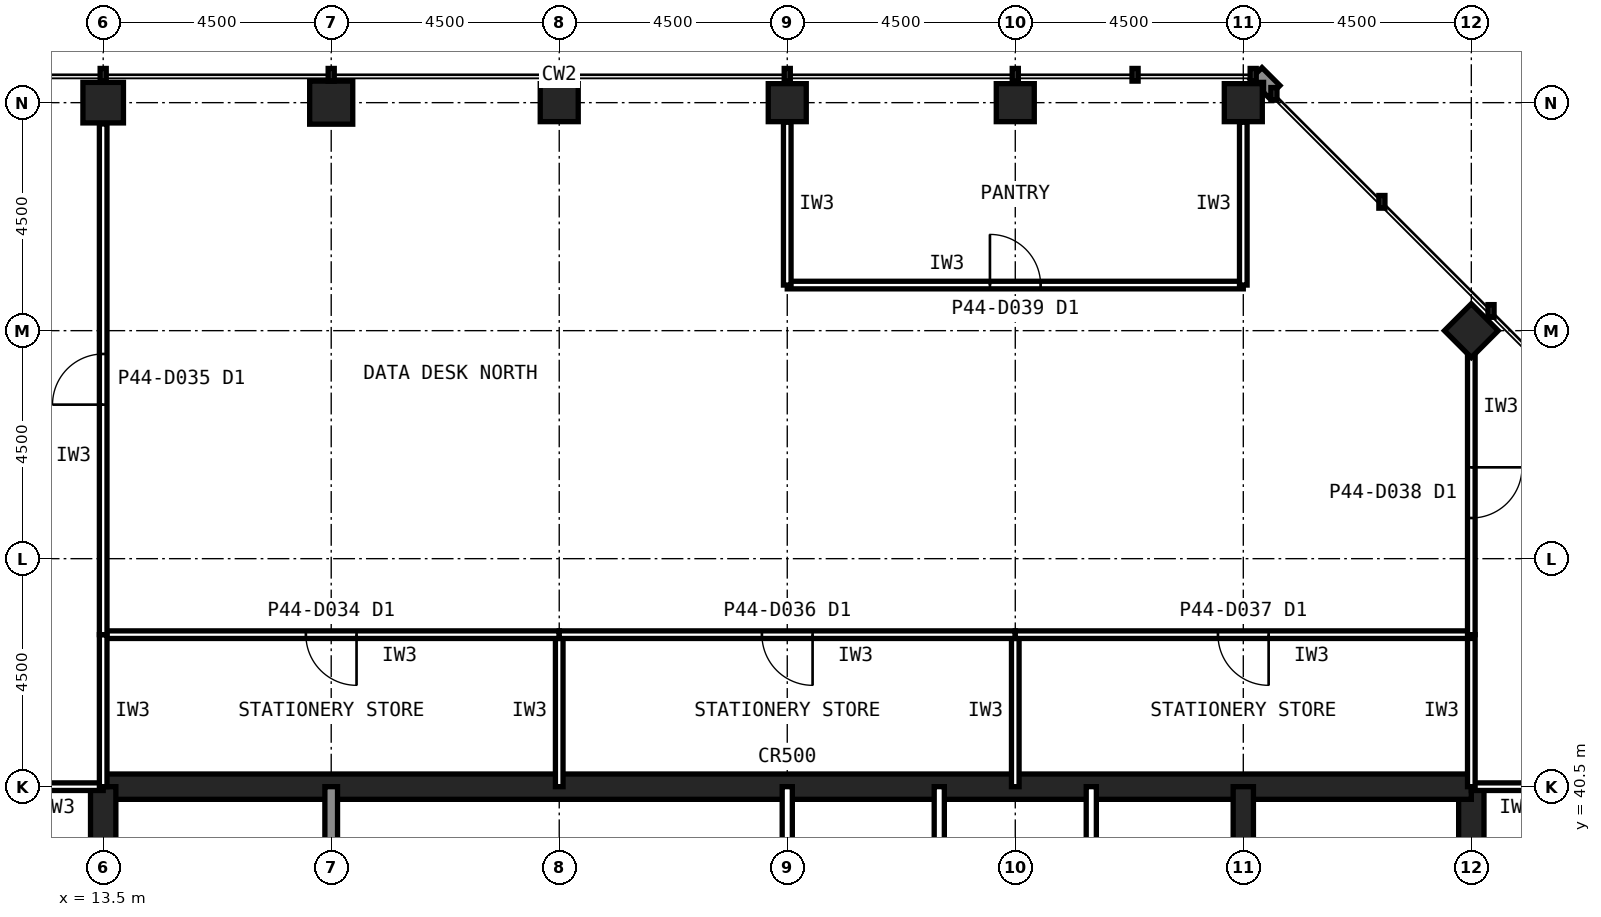
"""IFC4 building model, lengths in metres.
Left out: names, types, materials, properties, quantities, classifications, styles, units other than length and angle.
Written with IfcOpenShell. Run it as: python <this file> out.ifc"""

import sys

from ifc_helpers import new_model, si_unit, direction, frame, frame_2d, origin, origin_2d, place, context, subcontext, project, spatial, rectangle, hollow_rectangle, extrude, element, fill, save


model = new_model("IFC4")
c1 = context("Model", 3, precision=1e-05, world=origin(), true_north=direction((0.0, 1.0)))
c2 = subcontext(c1, "Body", "Model", "MODEL_VIEW")
j1 = project(units=[si_unit("LENGTHUNIT", "METRE"), si_unit("PLANEANGLEUNIT", "RADIAN")], contexts=[c1])
p1 = place(None, origin())
s1 = spatial("IfcSite", under=j1, at=p1, CompositionType="ELEMENT")
p2 = place(p1, origin())
s2 = spatial("IfcBuilding", under=s1, at=p2, CompositionType="ELEMENT")
p3 = place(p2, frame((0.0, 0.0, 183.6)))
s3 = spatial("IfcBuildingStorey", under=s2, at=p3, CompositionType="ELEMENT", Elevation=183.6)
for number, where, z_axis, x_axis in (
    (1, (36.0, 54.0, 0.0), (0.0, 0.0, 1.0), (1.0, 0.0, 0.0)),
    (2, (31.5, 54.0, 0.0), (0.0, 0.0, 1.0), (1.0, 0.0, 0.0)),
    (3, (27.0, 54.0, 0.0), (0.0, 0.0, 1.0), (1.0, 0.0, 0.0)),
    (4, (22.5, 54.0, 0.0), (0.0, 0.0, 1.0), (1.0, 0.0, 0.0)),
):
    element("IfcColumn", number, at=place(p3, frame(where, z_axis=z_axis, x_axis=x_axis)), inside=s3, PredefinedType="COLUMN", context=c2, shape_type="SweptSolid", body=[
        extrude(hollow_rectangle(XDim=0.7, YDim=0.7, WallThickness=0.036, at=origin_2d()), origin(), (0.0, 0.0, 1.0), 4.0),
    ])
p4 = place(p3, frame((18.0, 54.0, 0.0), z_axis=(0.0, 0.0, 1.0), x_axis=(1.0, 0.0, 0.0)))
e5 = element("IfcColumn", 5, at=p4, inside=s3, PredefinedType="COLUMN", context=c2, shape_type="SweptSolid", body=[
    extrude(hollow_rectangle(XDim=0.8, YDim=0.8, WallThickness=0.045, at=origin_2d()), origin(), (0.0, 0.0, 1.0), 4.0),
])
p5 = place(p3, frame((13.5, 54.0, 0.0), z_axis=(0.0, 0.0, 1.0), x_axis=(1.0, 0.0, 0.0)))
e6 = element("IfcColumn", 6, at=p5, inside=s3, PredefinedType="COLUMN", context=c2, shape_type="SweptSolid", body=[
    extrude(hollow_rectangle(XDim=0.75, YDim=0.75, WallThickness=0.04, at=origin_2d()), origin(), (0.0, 0.0, 1.0), 4.0),
])
p6 = place(p3, frame((40.5, 49.5, 0.0), z_axis=(0.0, 0.0, 1.0), x_axis=(0.707106781187, 0.707106781187, 0.0)))
e7 = element("IfcColumn", 7, at=p6, inside=s3, PredefinedType="COLUMN", context=c2, shape_type="SweptSolid", body=[
    extrude(hollow_rectangle(XDim=0.7, YDim=0.7, WallThickness=0.036, at=origin_2d()), origin(), (0.0, 0.0, 1.0), 4.0),
])
p7 = place(p3, frame((40.5, 13.5, 0.0), z_axis=(0.0, 0.0, 1.0), x_axis=(0.0, 1.0, 0.0)))
e8 = element("IfcWall", 8, at=p7, inside=s3, PredefinedType="SHEAR", context=c2, shape_type="SweptSolid", body=[
    extrude(rectangle(XDim=27.0, YDim=0.5, at=frame_2d((13.5, 0.0))), origin(), (0.0, 0.0, 1.0), 4.0),
])
p8 = place(p7, frame((5.85, 0.0, 0.0)))
e9 = element("IfcOpeningElement", 9, at=p8, cuts=e8, PredefinedType="OPENING", context=c2, shape_type="SweptSolid", body=[
    extrude(rectangle(XDim=1.8, YDim=2.1, at=frame_2d((0.9, 1.05))), frame((0.0, 0.26, 0.0), z_axis=(0.0, -1.0, 0.0), x_axis=(1.0, 0.0, 0.0)), (0.0, 0.0, 1.0), 0.52),
])
p9 = place(p7, frame((19.65, 0.0, 0.0)))
e10 = element("IfcOpeningElement", 10, at=p9, cuts=e8, PredefinedType="OPENING", context=c2, shape_type="SweptSolid", body=[
    extrude(rectangle(XDim=1.2, YDim=2.1, at=frame_2d((0.6, 1.05))), frame((0.0, 0.26, 0.0), z_axis=(0.0, -1.0, 0.0), x_axis=(1.0, 0.0, 0.0)), (0.0, 0.0, 1.0), 0.52),
])
p10 = place(p3, frame((40.5, 40.5, 0.0), z_axis=(0.0, 0.0, 1.0), x_axis=(-1.0, 0.0, 0.0)))
e11 = element("IfcWall", 11, at=p10, inside=s3, PredefinedType="SHEAR", context=c2, shape_type="SweptSolid", body=[
    extrude(rectangle(XDim=27.0, YDim=0.5, at=frame_2d((13.5, 0.0))), origin(), (0.0, 0.0, 1.0), 4.0),
])
p11 = place(p3, frame((13.5, 40.5, 0.0), z_axis=(0.0, 0.0, 1.0), x_axis=(0.0, -1.0, 0.0)))
e12 = element("IfcWall", 12, at=p11, inside=s3, PredefinedType="SHEAR", context=c2, shape_type="SweptSolid", body=[
    extrude(rectangle(XDim=27.0, YDim=0.5, at=frame_2d((13.5, 0.0))), origin(), (0.0, 0.0, 1.0), 4.0),
])
p12 = place(p11, frame((19.65, 0.0, 0.0)))
e13 = element("IfcOpeningElement", 13, at=p12, cuts=e12, PredefinedType="OPENING", context=c2, shape_type="SweptSolid", body=[
    extrude(rectangle(XDim=1.2, YDim=2.1, at=frame_2d((0.6, 1.05))), frame((0.0, 0.26, 0.0), z_axis=(0.0, -1.0, 0.0), x_axis=(1.0, 0.0, 0.0)), (0.0, 0.0, 1.0), 0.52),
])
p13 = place(p11, frame((5.85, 0.0, 0.0)))
e14 = element("IfcOpeningElement", 14, at=p13, cuts=e12, PredefinedType="OPENING", context=c2, shape_type="SweptSolid", body=[
    extrude(rectangle(XDim=1.8, YDim=2.1, at=frame_2d((0.9, 1.05))), frame((0.0, 0.26, 0.0), z_axis=(0.0, -1.0, 0.0), x_axis=(1.0, 0.0, 0.0)), (0.0, 0.0, 1.0), 0.52),
])
p14 = place(p3, frame((18.0, 36.0, 0.0), z_axis=(0.0, 0.0, 1.0), x_axis=(0.0, 1.0, 0.0)))
e15 = element("IfcWall", 15, at=p14, inside=s3, PredefinedType="SOLIDWALL", context=c2, shape_type="SweptSolid", body=[
    extrude(rectangle(XDim=4.5, YDim=0.25, at=frame_2d((2.25, 0.0))), origin(), (0.0, 0.0, 1.0), 3.84),
])
p15 = place(p3, frame((36.0, 22.5, 0.0), z_axis=(0.0, 0.0, 1.0), x_axis=(0.0, 1.0, 0.0)))
e16 = element("IfcWall", 16, at=p15, inside=s3, PredefinedType="SHEAR", context=c2, shape_type="SweptSolid", body=[
    extrude(rectangle(XDim=18.0, YDim=0.4, at=frame_2d((9.0, 0.0))), origin(), (0.0, 0.0, 1.0), 4.0),
])
for number, where, z_axis, x_axis in (
    (17, (21.0, 36.0, 0.0), (0.0, 0.0, 1.0), (0.0, 1.0, 0.0)),
    (18, (27.0, 36.0, 0.0), (0.0, 0.0, 1.0), (0.0, 1.0, 0.0)),
    (19, (30.0, 36.0, 0.0), (0.0, 0.0, 1.0), (0.0, 1.0, 0.0)),
    (20, (33.0, 36.0, 0.0), (0.0, 0.0, 1.0), (0.0, 1.0, 0.0)),
):
    element("IfcWall", number, at=place(p3, frame(where, z_axis=z_axis, x_axis=x_axis)), inside=s3, PredefinedType="PARTITIONING", context=c2, shape_type="SweptSolid", body=[
        extrude(rectangle(XDim=4.5, YDim=0.2, at=frame_2d((2.25, 0.0))), origin(), (0.0, 0.0, 1.0), 3.84),
    ])
p16 = place(p3, frame((22.5, 45.3, 0.0), z_axis=(0.0, 0.0, 1.0), x_axis=(-1.0, 0.0, 0.0)))
e21 = element("IfcWall", 21, at=p16, inside=s3, PredefinedType="PARTITIONING", context=c2, shape_type="SweptSolid", body=[
    extrude(rectangle(XDim=10.8, YDim=0.15, at=frame_2d((5.4, 0.0))), origin(), (0.0, 0.0, 1.0), 3.84),
])
p17 = place(p16, frame((4.9, 0.0, 0.0)))
e22 = element("IfcOpeningElement", 22, at=p17, cuts=e21, PredefinedType="OPENING", context=c2, shape_type="SweptSolid", body=[
    extrude(rectangle(XDim=1.0, YDim=2.1, at=frame_2d((0.5, 1.05))), frame((0.0, 0.085, 0.0), z_axis=(0.0, -1.0, 0.0), x_axis=(1.0, 0.0, 0.0)), (0.0, 0.0, 1.0), 0.17),
])
for number, where, z_axis, x_axis in (
    (23, (22.5, 43.5, 0.0), (0.0, 0.0, 1.0), (0.0, 1.0, 0.0)),
    (24, (42.3, 40.5, 0.0), (0.0, 0.0, 1.0), (-1.0, 0.0, 0.0)),
):
    element("IfcWall", number, at=place(p3, frame(where, z_axis=z_axis, x_axis=x_axis)), inside=s3, PredefinedType="PARTITIONING", context=c2, shape_type="SweptSolid", body=[
        extrude(rectangle(XDim=1.8, YDim=0.15, at=frame_2d((0.9, 0.0))), origin(), (0.0, 0.0, 1.0), 2.989),
    ])
p18 = place(p3, frame((22.5, 40.5, 0.0), z_axis=(0.0, 0.0, 1.0), x_axis=(0.0, 1.0, 0.0)))
e25 = element("IfcWall", 25, at=p18, inside=s3, PredefinedType="PARTITIONING", context=c2, shape_type="SweptSolid", body=[
    extrude(rectangle(XDim=3.0, YDim=0.15, at=frame_2d((1.5, 0.0))), origin(), (0.0, 0.0, 1.0), 2.989),
])
p19 = place(p3, frame((22.5, 43.5, 0.0), z_axis=(0.0, 0.0, 1.0), x_axis=(-1.0, 0.0, 0.0)))
e26 = element("IfcWall", 26, at=p19, inside=s3, PredefinedType="PARTITIONING", context=c2, shape_type="SweptSolid", body=[
    extrude(rectangle(XDim=9.0, YDim=0.15, at=frame_2d((4.5, 0.0))), origin(), (0.0, 0.0, 1.0), 3.84),
])
p20 = place(p19, frame((4.0, 0.0, 0.0)))
e27 = element("IfcOpeningElement", 27, at=p20, cuts=e26, PredefinedType="OPENING", context=c2, shape_type="SweptSolid", body=[
    extrude(rectangle(XDim=1.0, YDim=2.1, at=frame_2d((0.5, 1.05))), frame((0.0, 0.085, 0.0), z_axis=(0.0, -1.0, 0.0), x_axis=(1.0, 0.0, 0.0)), (0.0, 0.0, 1.0), 0.17),
])
for number, where, z_axis, x_axis in (
    (28, (13.5, 43.5, 0.0), (0.0, 0.0, 1.0), (0.0, -1.0, 0.0)),
    (29, (31.5, 40.5, 0.0), (0.0, 0.0, 1.0), (0.0, 1.0, 0.0)),
):
    element("IfcWall", number, at=place(p3, frame(where, z_axis=z_axis, x_axis=x_axis)), inside=s3, PredefinedType="PARTITIONING", context=c2, shape_type="SweptSolid", body=[
        extrude(rectangle(XDim=3.0, YDim=0.15, at=frame_2d((1.5, 0.0))), origin(), (0.0, 0.0, 1.0), 2.989),
    ])
p21 = place(p3, frame((31.5, 43.5, 0.0), z_axis=(0.0, 0.0, 1.0), x_axis=(-1.0, 0.0, 0.0)))
e30 = element("IfcWall", 30, at=p21, inside=s3, PredefinedType="PARTITIONING", context=c2, shape_type="SweptSolid", body=[
    extrude(rectangle(XDim=9.0, YDim=0.15, at=frame_2d((4.5, 0.0))), origin(), (0.0, 0.0, 1.0), 3.84),
])
p22 = place(p21, frame((4.0, 0.0, 0.0)))
e31 = element("IfcOpeningElement", 31, at=p22, cuts=e30, PredefinedType="OPENING", context=c2, shape_type="SweptSolid", body=[
    extrude(rectangle(XDim=1.0, YDim=2.1, at=frame_2d((0.5, 1.05))), frame((0.0, 0.085, 0.0), z_axis=(0.0, -1.0, 0.0), x_axis=(1.0, 0.0, 0.0)), (0.0, 0.0, 1.0), 0.17),
])
p23 = place(p3, frame((40.5, 40.5, 0.0), z_axis=(0.0, 0.0, 1.0), x_axis=(0.0, 1.0, 0.0)))
e32 = element("IfcWall", 32, at=p23, inside=s3, PredefinedType="PARTITIONING", context=c2, shape_type="SweptSolid", body=[
    extrude(rectangle(XDim=3.0, YDim=0.15, at=frame_2d((1.5, 0.0))), origin(), (0.0, 0.0, 1.0), 2.989),
])
p24 = place(p3, frame((40.5, 43.5, 0.0), z_axis=(0.0, 0.0, 1.0), x_axis=(-1.0, 0.0, 0.0)))
e33 = element("IfcWall", 33, at=p24, inside=s3, PredefinedType="PARTITIONING", context=c2, shape_type="SweptSolid", body=[
    extrude(rectangle(XDim=9.0, YDim=0.15, at=frame_2d((4.5, 0.0))), origin(), (0.0, 0.0, 1.0), 3.84),
])
p25 = place(p24, frame((4.0, 0.0, 0.0)))
e34 = element("IfcOpeningElement", 34, at=p25, cuts=e33, PredefinedType="OPENING", context=c2, shape_type="SweptSolid", body=[
    extrude(rectangle(XDim=1.0, YDim=2.1, at=frame_2d((0.5, 1.05))), frame((0.0, 0.085, 0.0), z_axis=(0.0, -1.0, 0.0), x_axis=(1.0, 0.0, 0.0)), (0.0, 0.0, 1.0), 0.17),
])
p26 = place(p3, frame((27.0, 50.4, 0.0), z_axis=(0.0, 0.0, 1.0), x_axis=(1.0, 0.0, 0.0)))
e35 = element("IfcWall", 35, at=p26, inside=s3, PredefinedType="PARTITIONING", context=c2, shape_type="SweptSolid", body=[
    extrude(rectangle(XDim=9.0, YDim=0.15, at=frame_2d((4.5, 0.0))), origin(), (0.0, 0.0, 1.0), 3.84),
])
p27 = place(p26, frame((4.0, 0.0, 0.0)))
e36 = element("IfcOpeningElement", 36, at=p27, cuts=e35, PredefinedType="OPENING", context=c2, shape_type="SweptSolid", body=[
    extrude(rectangle(XDim=1.0, YDim=2.1, at=frame_2d((0.5, 1.05))), frame((0.0, 0.085, 0.0), z_axis=(0.0, -1.0, 0.0), x_axis=(1.0, 0.0, 0.0)), (0.0, 0.0, 1.0), 0.17),
])
for number, where, z_axis, x_axis in (
    (37, (36.0, 50.4, 0.0), (0.0, 0.0, 1.0), (0.0, 1.0, 0.0)),
    (38, (27.0, 53.64, 0.0), (0.0, 0.0, 1.0), (0.0, -1.0, 0.0)),
):
    element("IfcWall", number, at=place(p3, frame(where, z_axis=z_axis, x_axis=x_axis)), inside=s3, PredefinedType="PARTITIONING", context=c2, shape_type="SweptSolid", body=[
        extrude(rectangle(XDim=3.24, YDim=0.15, at=frame_2d((1.62, 0.0))), origin(), (0.0, 0.0, 1.0), 2.989),
    ])
p28 = place(p3, frame((40.5, 49.13, 0.0), z_axis=(0.0, 0.0, 1.0), x_axis=(0.0, -1.0, 0.0)))
e39 = element("IfcWall", 39, at=p28, inside=s3, PredefinedType="PARTITIONING", context=c2, shape_type="SweptSolid", body=[
    extrude(rectangle(XDim=5.63, YDim=0.15, at=frame_2d((2.815, 0.0))), origin(), (0.0, 0.0, 1.0), 2.989),
])
p29 = place(p28, frame((2.315, 0.0, 0.0)))
e40 = element("IfcOpeningElement", 40, at=p29, cuts=e39, PredefinedType="OPENING", context=c2, shape_type="SweptSolid", body=[
    extrude(rectangle(XDim=1.0, YDim=2.1, at=frame_2d((0.5, 1.05))), frame((0.0, 0.085, 0.0), z_axis=(0.0, -1.0, 0.0), x_axis=(1.0, 0.0, 0.0)), (0.0, 0.0, 1.0), 0.17),
])
p30 = place(p3, frame((13.5, 45.3, 0.0), z_axis=(0.0, 0.0, 1.0), x_axis=(0.0, 1.0, 0.0)))
e41 = element("IfcWall", 41, at=p30, inside=s3, PredefinedType="PARTITIONING", context=c2, shape_type="SweptSolid", body=[
    extrude(rectangle(XDim=8.305, YDim=0.15, at=frame_2d((4.152, 0.0))), origin(), (0.0, 0.0, 1.0), 2.989),
])
p31 = place(p30, frame((3.653, 0.0, 0.0)))
e42 = element("IfcOpeningElement", 42, at=p31, cuts=e41, PredefinedType="OPENING", context=c2, shape_type="SweptSolid", body=[
    extrude(rectangle(XDim=1.0, YDim=2.1, at=frame_2d((0.5, 1.05))), frame((0.0, 0.085, 0.0), z_axis=(0.0, -1.0, 0.0), x_axis=(1.0, 0.0, 0.0)), (0.0, 0.0, 1.0), 0.17),
])
p32 = place(p17, origin())
e43 = element("IfcDoor", 43, at=p32, inside=s3, OperationType="SINGLE_SWING_LEFT", PredefinedType="DOOR", context=c2, shape_type="SweptSolid", body=[
    extrude(rectangle(XDim=1.0, YDim=2.1, at=frame_2d((0.5, 1.05))), frame((0.0, 0.025, 0.0), z_axis=(0.0, -1.0, 0.0), x_axis=(1.0, 0.0, 0.0)), (0.0, 0.0, 1.0), 0.05),
])
fill(e22, e43)
p33 = place(p20, origin())
e44 = element("IfcDoor", 44, at=p33, inside=s3, OperationType="SINGLE_SWING_LEFT", PredefinedType="DOOR", context=c2, shape_type="SweptSolid", body=[
    extrude(rectangle(XDim=1.0, YDim=2.1, at=frame_2d((0.5, 1.05))), frame((0.0, 0.025, 0.0), z_axis=(0.0, -1.0, 0.0), x_axis=(1.0, 0.0, 0.0)), (0.0, 0.0, 1.0), 0.05),
])
fill(e27, e44)
p34 = place(p22, origin())
e45 = element("IfcDoor", 45, at=p34, inside=s3, OperationType="SINGLE_SWING_LEFT", PredefinedType="DOOR", context=c2, shape_type="SweptSolid", body=[
    extrude(rectangle(XDim=1.0, YDim=2.1, at=frame_2d((0.5, 1.05))), frame((0.0, 0.025, 0.0), z_axis=(0.0, -1.0, 0.0), x_axis=(1.0, 0.0, 0.0)), (0.0, 0.0, 1.0), 0.05),
])
fill(e31, e45)
p35 = place(p25, origin())
e46 = element("IfcDoor", 46, at=p35, inside=s3, OperationType="SINGLE_SWING_LEFT", PredefinedType="DOOR", context=c2, shape_type="SweptSolid", body=[
    extrude(rectangle(XDim=1.0, YDim=2.1, at=frame_2d((0.5, 1.05))), frame((0.0, 0.025, 0.0), z_axis=(0.0, -1.0, 0.0), x_axis=(1.0, 0.0, 0.0)), (0.0, 0.0, 1.0), 0.05),
])
fill(e34, e46)
p36 = place(p27, origin())
e47 = element("IfcDoor", 47, at=p36, inside=s3, OperationType="SINGLE_SWING_LEFT", PredefinedType="DOOR", context=c2, shape_type="SweptSolid", body=[
    extrude(rectangle(XDim=1.0, YDim=2.1, at=frame_2d((0.5, 1.05))), frame((0.0, 0.025, 0.0), z_axis=(0.0, -1.0, 0.0), x_axis=(1.0, 0.0, 0.0)), (0.0, 0.0, 1.0), 0.05),
])
fill(e36, e47)
p37 = place(p29, origin())
e48 = element("IfcDoor", 48, at=p37, inside=s3, OperationType="SINGLE_SWING_LEFT", PredefinedType="DOOR", context=c2, shape_type="SweptSolid", body=[
    extrude(rectangle(XDim=1.0, YDim=2.1, at=frame_2d((0.5, 1.05))), frame((0.0, 0.025, 0.0), z_axis=(0.0, -1.0, 0.0), x_axis=(1.0, 0.0, 0.0)), (0.0, 0.0, 1.0), 0.05),
])
fill(e40, e48)
p38 = place(p31, origin())
e49 = element("IfcDoor", 49, at=p38, inside=s3, OperationType="SINGLE_SWING_LEFT", PredefinedType="DOOR", context=c2, shape_type="SweptSolid", body=[
    extrude(rectangle(XDim=1.0, YDim=2.1, at=frame_2d((0.5, 1.05))), frame((0.0, 0.025, 0.0), z_axis=(0.0, -1.0, 0.0), x_axis=(1.0, 0.0, 0.0)), (0.0, 0.0, 1.0), 0.05),
])
fill(e42, e49)
save(model, sys.argv[1])
